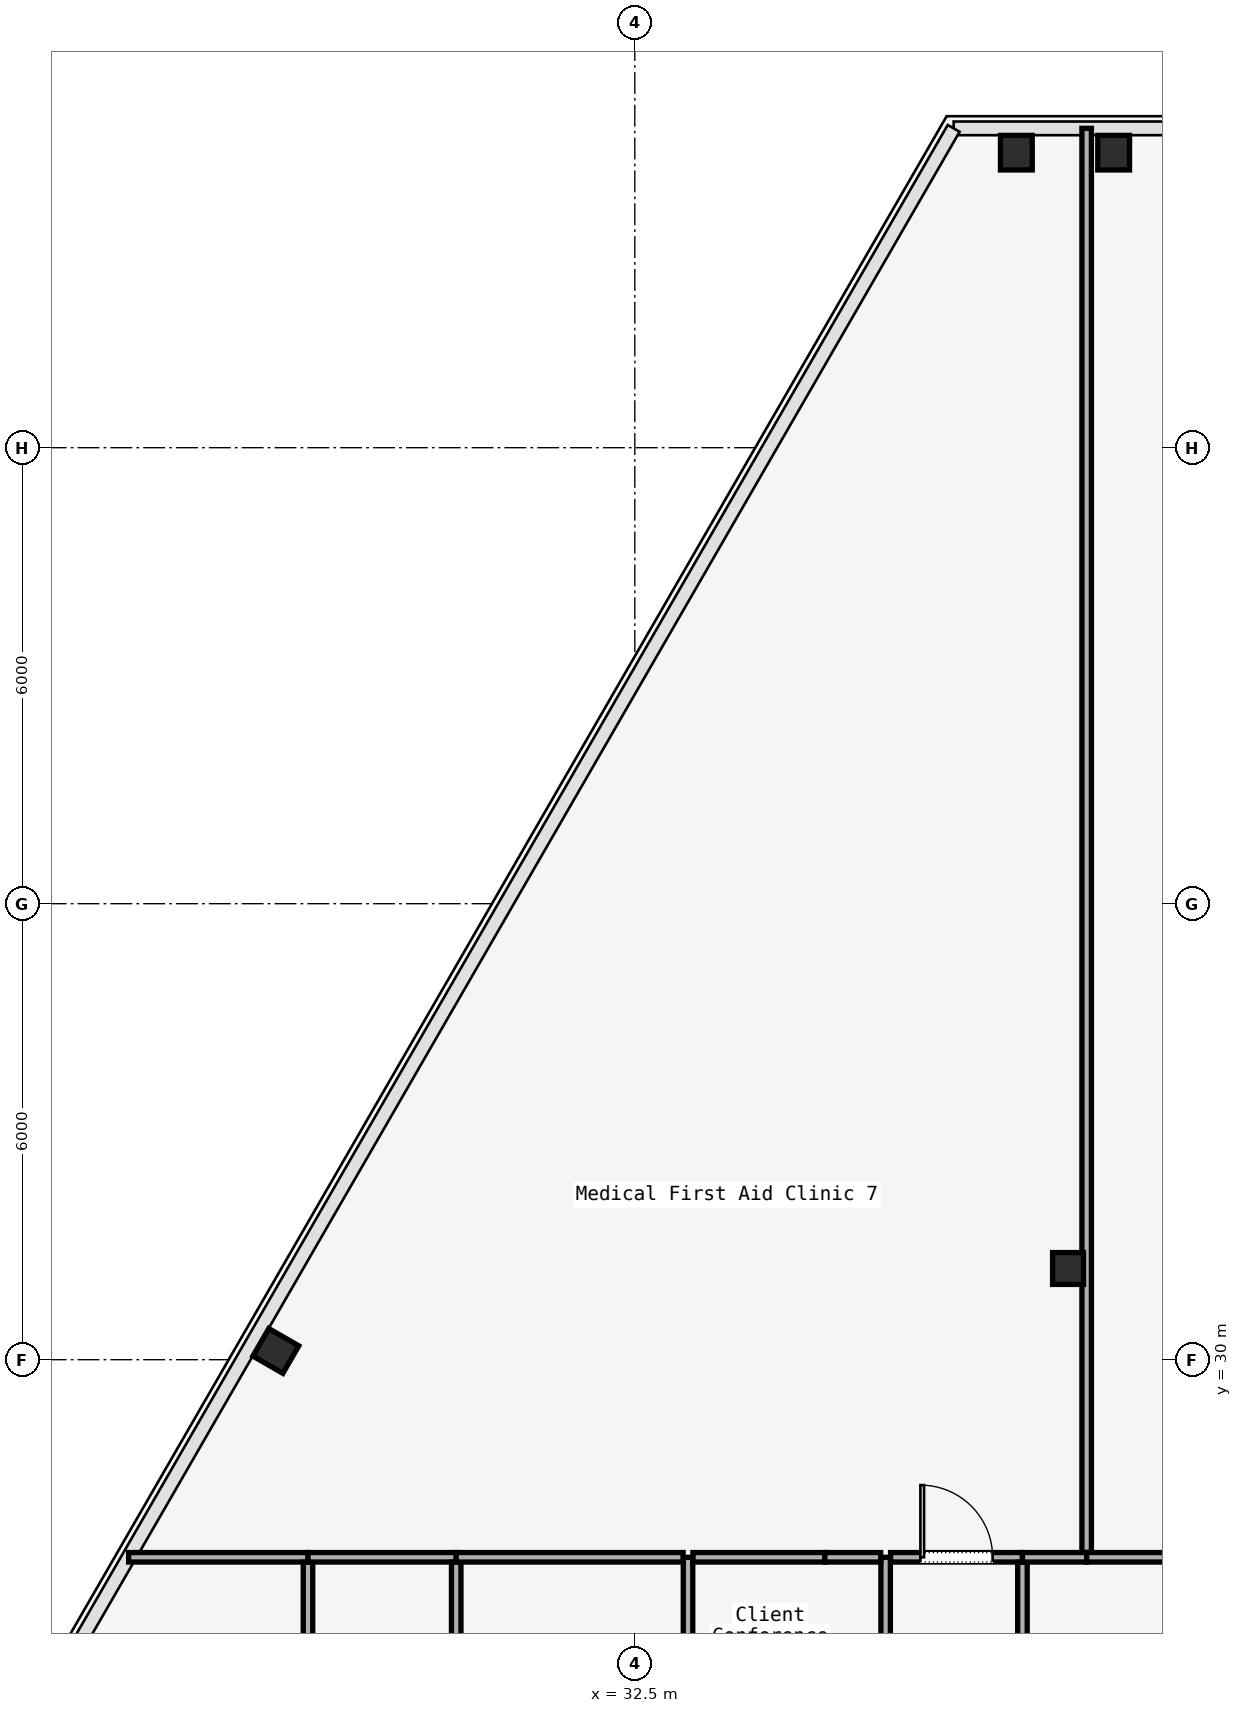
"""IFC4 building model, lengths in metres.
Left out: names, types, materials, properties, quantities, classifications, styles, units other than length and angle.
Written with IfcOpenShell. Run it as: python <this file> out.ifc"""

import sys

from ifc_helpers import new_model, si_unit, direction, frame, frame_2d, origin, origin_2d, place, context, subcontext, project, spatial, rectangle, i_section, extrude, element, fill, save


model = new_model("IFC4")
c1 = context("Model", 3, precision=1e-05, world=origin(), true_north=direction((0.0, 1.0)))
c2 = subcontext(c1, "Body", "Model", "MODEL_VIEW")
j1 = project(units=[si_unit("LENGTHUNIT", "METRE"), si_unit("PLANEANGLEUNIT", "RADIAN")], contexts=[c1])
p1 = place(None, origin())
s1 = spatial("IfcSite", under=j1, at=p1, CompositionType="ELEMENT")
p2 = place(p1, origin())
s2 = spatial("IfcBuilding", under=s1, at=p2, CompositionType="ELEMENT")
p3 = place(p2, frame((0.0, 0.0, 168.8)))
s3 = spatial("IfcBuildingStorey", under=s2, at=p3, CompositionType="ELEMENT", Elevation=168.8)
p4 = place(p3, frame((38.2, 31.2, 0.0), z_axis=(0.0, 0.0, 1.0), x_axis=(1.0, 0.0, 0.0)))
e1 = element("IfcColumn", 1, at=p4, inside=s3, PredefinedType="COLUMN", context=c2, shape_type="SweptSolid", body=[
    extrude(i_section(OverallWidth=0.407, OverallDepth=0.419, WebThickness=0.031, FlangeThickness=0.049, FilletRadius=0.015, at=origin_2d()), origin(), (0.0, 0.0, 1.0), 3.58),
])
p5 = place(p3, frame((38.8, 45.882, 0.0), z_axis=(0.049923200694, 0.013008637561, 0.998668338029), x_axis=(-0.25215317949, 0.967687332806, 0.0)))
e2 = element("IfcColumn", 2, at=p5, inside=s3, PredefinedType="COLUMN", context=c2, shape_type="SweptSolid", body=[
    extrude(i_section(OverallWidth=0.418, OverallDepth=0.455, WebThickness=0.042, FlangeThickness=0.052, FilletRadius=0.015, at=origin_2d()), origin(), (0.0, 0.0, 1.0), 3.585),
])
p6 = place(p3, frame((37.52, 45.882, 0.0), z_axis=(0.06979547813, 0.012993115324, 0.997476701576), x_axis=(-0.183015605797, 0.983110008104, 0.0)))
e3 = element("IfcColumn", 3, at=p6, inside=s3, PredefinedType="COLUMN", context=c2, shape_type="SweptSolid", body=[
    extrude(i_section(OverallWidth=0.418, OverallDepth=0.455, WebThickness=0.042, FlangeThickness=0.052, FilletRadius=0.015, at=origin_2d()), origin(), (0.0, 0.0, 1.0), 3.589),
])
p7 = place(p3, frame((27.777, 30.115, 0.0), z_axis=(0.036118944898, -0.062578962912, 0.997386231718), x_axis=(0.001263812759, 0.998039515346, 0.062574184651)))
e4 = element("IfcColumn", 4, at=p7, inside=s3, PredefinedType="COLUMN", context=c2, shape_type="SweptSolid", body=[
    extrude(i_section(OverallWidth=0.418, OverallDepth=0.455, WebThickness=0.042, FlangeThickness=0.052, FilletRadius=0.015, at=origin_2d()), origin(), (0.0, 0.0, 1.0), 3.589),
])
p8 = place(p3, frame((35.8, 21.368, 0.0), z_axis=(0.0, 0.0, 1.0), x_axis=(0.0, 1.0, 0.0)))
e5 = element("IfcWall", 5, at=p8, inside=s3, PredefinedType="PARTITIONING", context=c2, shape_type="SweptSolid", body=[
    extrude(rectangle(XDim=6.032, YDim=0.125, at=frame_2d((3.016, 0.0))), origin(), (0.0, 0.0, 1.0), 3.01),
])
p9 = place(p8, frame((2.766, 0.0, 0.0)))
e6 = element("IfcOpeningElement", 6, at=p9, cuts=e5, PredefinedType="OPENING", context=c2, shape_type="SweptSolid", body=[
    extrude(rectangle(XDim=1.4, YDim=2.2, at=frame_2d((0.7, 1.1))), frame((0.0, 0.062, 0.0), z_axis=(0.0, -1.0, 0.0), x_axis=(1.0, 0.0, 0.0)), (0.0, 0.0, 1.0), 0.125),
])
p10 = place(p3, frame((35.865, 27.4, 0.0), z_axis=(0.0, 0.0, 1.0), x_axis=(1.0, 0.0, 0.0)))
e7 = element("IfcWall", 7, at=p10, inside=s3, PredefinedType="PARTITIONING", context=c2, shape_type="SweptSolid", body=[
    extrude(rectangle(XDim=1.735, YDim=0.125, at=frame_2d((0.868, 0.0))), origin(), (0.0, 0.0, 1.0), 3.01),
])
p11 = place(p10, frame((0.393, 0.0, 0.0)))
e8 = element("IfcOpeningElement", 8, at=p11, cuts=e7, PredefinedType="OPENING", context=c2, shape_type="SweptSolid", body=[
    extrude(rectangle(XDim=0.95, YDim=2.2, at=frame_2d((0.475, 1.1))), frame((0.0, 0.062, 0.0), z_axis=(0.0, -1.0, 0.0), x_axis=(1.0, 0.0, 0.0)), (0.0, 0.0, 1.0), 0.125),
])
p12 = place(p3, frame((37.6, 27.335, 0.0), z_axis=(0.0, 0.0, 1.0), x_axis=(0.0, -1.0, 0.0)))
e9 = element("IfcWall", 9, at=p12, inside=s3, PredefinedType="PARTITIONING", context=c2, shape_type="SweptSolid", body=[
    extrude(rectangle(XDim=5.655, YDim=0.125, at=frame_2d((2.828, 0.0))), origin(), (0.0, 0.0, 1.0), 3.01),
])
p13 = place(p12, frame((2.353, 0.0, 0.0)))
e10 = element("IfcOpeningElement", 10, at=p13, cuts=e9, PredefinedType="OPENING", context=c2, shape_type="SweptSolid", body=[
    extrude(rectangle(XDim=0.95, YDim=2.2, at=frame_2d((0.475, 1.1))), frame((0.0, 0.062, 0.0), z_axis=(0.0, -1.0, 0.0), x_axis=(1.0, 0.0, 0.0)), (0.0, 0.0, 1.0), 0.125),
])
p14 = place(p3, frame((25.84, 27.4, 0.0), z_axis=(0.0, 0.0, 1.0), x_axis=(1.0, 0.0, 0.0)))
e11 = element("IfcWall", 11, at=p14, inside=s3, PredefinedType="PARTITIONING", context=c2, shape_type="SweptSolid", body=[
    extrude(rectangle(XDim=2.36, YDim=0.125, at=frame_2d((1.18, 0.0))), origin(), (0.0, 0.0, 1.0), 3.01),
])
p15 = place(p3, frame((28.2, 27.335, 0.0), z_axis=(0.0, 0.0, 1.0), x_axis=(0.0, -1.0, 0.0)))
e12 = element("IfcWall", 12, at=p15, inside=s3, PredefinedType="PARTITIONING", context=c2, shape_type="SweptSolid", body=[
    extrude(rectangle(XDim=10.27, YDim=0.125, at=frame_2d((5.135, 0.0))), origin(), (0.0, 0.0, 1.0), 3.01),
])
p16 = place(p3, frame((28.2, 27.4, 0.0), z_axis=(0.0, 0.0, 1.0), x_axis=(1.0, 0.0, 0.0)))
e13 = element("IfcWall", 13, at=p16, inside=s3, PredefinedType="PARTITIONING", context=c2, shape_type="SweptSolid", body=[
    extrude(rectangle(XDim=1.95, YDim=0.125, at=frame_2d((0.975, 0.0))), origin(), (0.0, 0.0, 1.0), 3.01),
])
p17 = place(p3, frame((30.15, 27.335, 0.0), z_axis=(0.0, 0.0, 1.0), x_axis=(0.0, -1.0, 0.0)))
e14 = element("IfcWall", 14, at=p17, inside=s3, PredefinedType="PARTITIONING", context=c2, shape_type="SweptSolid", body=[
    extrude(rectangle(XDim=10.27, YDim=0.125, at=frame_2d((5.135, 0.0))), origin(), (0.0, 0.0, 1.0), 3.01),
])
p18 = place(p3, frame((33.2, 27.4, 0.0), z_axis=(0.0, 0.0, 1.0), x_axis=(0.0, -1.0, 0.0)))
e15 = element("IfcWall", 15, at=p18, inside=s3, PredefinedType="PARTITIONING", context=c2, shape_type="SweptSolid", body=[
    extrude(rectangle(XDim=5.967, YDim=0.125, at=frame_2d((2.983, 0.0))), origin(), (0.0, 0.0, 1.0), 3.01),
])
p19 = place(p3, frame((30.15, 27.4, 0.0), z_axis=(0.0, 0.0, 1.0), x_axis=(1.0, 0.0, 0.0)))
e16 = element("IfcWall", 16, at=p19, inside=s3, PredefinedType="PARTITIONING", context=c2, shape_type="SweptSolid", body=[
    extrude(rectangle(XDim=2.985, YDim=0.125, at=frame_2d((1.493, 0.0))), origin(), (0.0, 0.0, 1.0), 3.01),
])
p20 = place(p3, frame((33.265, 27.4, 0.0), z_axis=(0.0, 0.0, 1.0), x_axis=(1.0, 0.0, 0.0)))
e17 = element("IfcWall", 17, at=p20, inside=s3, PredefinedType="PARTITIONING", context=c2, shape_type="SweptSolid", body=[
    extrude(rectangle(XDim=1.735, YDim=0.125, at=frame_2d((0.868, 0.0))), origin(), (0.0, 0.0, 1.0), 3.01),
])
p21 = place(p3, frame((35.0, 27.4, 0.0), z_axis=(0.0, 0.0, 1.0), x_axis=(1.0, 0.0, 0.0)))
e18 = element("IfcWall", 18, at=p21, inside=s3, PredefinedType="PARTITIONING", context=c2, shape_type="SweptSolid", body=[
    extrude(rectangle(XDim=0.735, YDim=0.125, at=frame_2d((0.368, 0.0))), origin(), (0.0, 0.0, 1.0), 3.01),
])
p22 = place(p3, frame((37.6, 27.4, 0.0), z_axis=(0.0, 0.0, 1.0), x_axis=(1.0, 0.0, 0.0)))
e19 = element("IfcWall", 19, at=p22, inside=s3, PredefinedType="PARTITIONING", context=c2, shape_type="SweptSolid", body=[
    extrude(rectangle(XDim=0.845, YDim=0.125, at=frame_2d((0.422, 0.0))), origin(), (0.0, 0.0, 1.0), 3.01),
])
p23 = place(p3, frame((38.445, 27.4, 0.0), z_axis=(0.0, 0.0, 1.0), x_axis=(1.0, 0.0, 0.0)))
e20 = element("IfcWall", 20, at=p23, inside=s3, PredefinedType="PARTITIONING", context=c2, shape_type="SweptSolid", body=[
    extrude(rectangle(XDim=2.755, YDim=0.125, at=frame_2d((1.377, 0.0))), origin(), (0.0, 0.0, 1.0), 3.01),
])
p24 = place(p3, frame((38.445, 46.202, 0.0), z_axis=(0.0, 0.0, 1.0), x_axis=(0.0, -1.0, 0.0)))
e21 = element("IfcWall", 21, at=p24, inside=s3, PredefinedType="PARTITIONING", context=c2, shape_type="SweptSolid", body=[
    extrude(rectangle(XDim=18.737, YDim=0.125, at=frame_2d((9.368, 0.0))), origin(), (0.0, 0.0, 1.0), 3.01),
])
p25 = place(p11, origin())
e22 = element("IfcDoor", 22, at=p25, inside=s3, OperationType="SINGLE_SWING_RIGHT", PredefinedType="DOOR", context=c2, shape_type="SweptSolid", body=[
    extrude(rectangle(XDim=0.95, YDim=2.2, at=frame_2d((0.475, 1.1))), frame((0.0, 0.025, 0.0), z_axis=(0.0, -1.0, 0.0), x_axis=(1.0, 0.0, 0.0)), (0.0, 0.0, 1.0), 0.05),
])
fill(e8, e22)
save(model, sys.argv[1])
